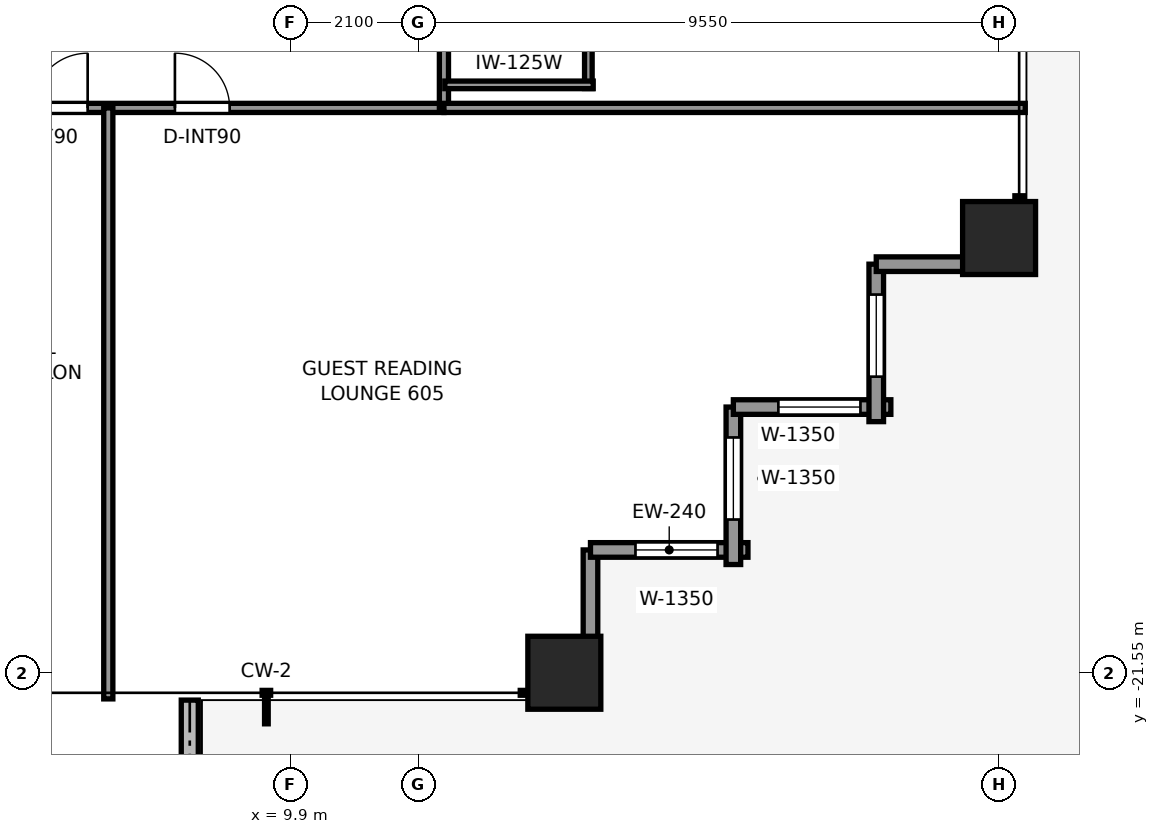
"""IFC4 building model, lengths in metres.
Left out: names, types, materials, properties, quantities, classifications, styles, units other than length and angle.
Written with IfcOpenShell. Run it as: python <this file> out.ifc"""

import sys

from ifc_helpers import new_model, si_unit, direction, frame, frame_2d, origin, origin_2d, place, context, subcontext, project, spatial, rectangle, extrude, element, fill, save


model = new_model("IFC4")
c1 = context("Model", 3, precision=1e-05, world=origin(), true_north=direction((0.0, 1.0)))
c2 = subcontext(c1, "Body", "Model", "MODEL_VIEW")
j1 = project(units=[si_unit("LENGTHUNIT", "METRE"), si_unit("PLANEANGLEUNIT", "RADIAN")], contexts=[c1])
p1 = place(None, origin())
s1 = spatial("IfcSite", under=j1, at=p1, CompositionType="ELEMENT")
p2 = place(p1, origin())
s2 = spatial("IfcBuilding", under=s1, at=p2, CompositionType="ELEMENT")
p3 = place(p2, frame((0.0, 0.0, 23.8)))
s3 = spatial("IfcBuildingStorey", under=s2, at=p3, CompositionType="ELEMENT", Elevation=23.8)
for number, where, z_axis, x_axis in (
    (1, (14.4, -21.55, 0.0), (0.0, 0.0, 1.0), (1.0, 0.0, 0.0)),
    (2, (21.55, -14.4, 0.0), (0.0, 0.0, 1.0), (1.0, 0.0, 0.0)),
):
    element("IfcColumn", number, at=place(p3, frame(where, z_axis=z_axis, x_axis=x_axis)), inside=s3, PredefinedType="COLUMN", context=c2, shape_type="SweptSolid", body=[
        extrude(rectangle(XDim=1.2, YDim=1.2, at=origin_2d()), origin(), (0.0, 0.0, 1.0), 3.3),
    ])
p4 = place(p3, frame((8.24, -25.42, -0.06), z_axis=(0.0, 0.0, 1.0), x_axis=(0.0, 1.0, 0.0)))
e3 = element("IfcWall", 3, at=p4, inside=s3, PredefinedType="PARAPET", context=c2, shape_type="SweptSolid", body=[
    extrude(rectangle(XDim=3.42, YDim=0.28, at=frame_2d((1.71, 0.0))), origin(), (0.0, 0.0, 1.0), 0.42),
])
p5 = place(p3, frame((14.83, -19.53, 0.0), z_axis=(0.0, 0.0, 1.0), x_axis=(0.0, -1.0, 0.0)))
e4 = element("IfcWall", 4, at=p5, inside=s3, PredefinedType="STANDARD", context=c2, shape_type="SweptSolid", body=[
    extrude(rectangle(XDim=2.59, YDim=0.24, at=frame_2d((1.295, 0.0))), origin(), (0.0, 0.0, 1.0), 2.439),
])
p6 = place(p3, frame((17.42, -19.53, 0.0), z_axis=(0.0, 0.0, 1.0), x_axis=(-1.0, 0.0, 0.0)))
e5 = element("IfcWall", 5, at=p6, inside=s3, PredefinedType="STANDARD", context=c2, shape_type="SweptSolid", body=[
    extrude(rectangle(XDim=2.59, YDim=0.24, at=frame_2d((1.295, 0.0))), origin(), (0.0, 0.0, 1.0), 2.439),
])
p7 = place(p6, frame((0.5, 0.0, 0.65)))
e6 = element("IfcOpeningElement", 6, at=p7, cuts=e5, PredefinedType="OPENING", context=c2, shape_type="SweptSolid", body=[
    extrude(rectangle(XDim=1.35, YDim=1.55, at=frame_2d((0.675, 0.775))), frame((0.0, 0.13, 0.0), z_axis=(0.0, -1.0, 0.0), x_axis=(1.0, 0.0, 0.0)), (0.0, 0.0, 1.0), 0.26),
])
p8 = place(p3, frame((17.18, -17.18, 0.0), z_axis=(0.0, 0.0, 1.0), x_axis=(0.0, -1.0, 0.0)))
e7 = element("IfcWall", 7, at=p8, inside=s3, PredefinedType="STANDARD", context=c2, shape_type="SweptSolid", body=[
    extrude(rectangle(XDim=2.59, YDim=0.24, at=frame_2d((1.295, 0.0))), origin(), (0.0, 0.0, 1.0), 2.439),
])
p9 = place(p8, frame((0.5, 0.0, 0.65)))
e8 = element("IfcOpeningElement", 8, at=p9, cuts=e7, PredefinedType="OPENING", context=c2, shape_type="SweptSolid", body=[
    extrude(rectangle(XDim=1.35, YDim=1.55, at=frame_2d((0.675, 0.775))), frame((0.0, 0.13, 0.0), z_axis=(0.0, -1.0, 0.0), x_axis=(1.0, 0.0, 0.0)), (0.0, 0.0, 1.0), 0.26),
])
p10 = place(p3, frame((19.77, -17.18, 0.0), z_axis=(0.0, 0.0, 1.0), x_axis=(-1.0, 0.0, 0.0)))
e9 = element("IfcWall", 9, at=p10, inside=s3, PredefinedType="STANDARD", context=c2, shape_type="SweptSolid", body=[
    extrude(rectangle(XDim=2.59, YDim=0.24, at=frame_2d((1.295, 0.0))), origin(), (0.0, 0.0, 1.0), 2.439),
])
p11 = place(p10, frame((0.5, 0.0, 0.65)))
e10 = element("IfcOpeningElement", 10, at=p11, cuts=e9, PredefinedType="OPENING", context=c2, shape_type="SweptSolid", body=[
    extrude(rectangle(XDim=1.35, YDim=1.55, at=frame_2d((0.675, 0.775))), frame((0.0, 0.13, 0.0), z_axis=(0.0, -1.0, 0.0), x_axis=(1.0, 0.0, 0.0)), (0.0, 0.0, 1.0), 0.26),
])
p12 = place(p3, frame((19.53, -14.83, 0.0), z_axis=(0.0, 0.0, 1.0), x_axis=(0.0, -1.0, 0.0)))
e11 = element("IfcWall", 11, at=p12, inside=s3, PredefinedType="STANDARD", context=c2, shape_type="SweptSolid", body=[
    extrude(rectangle(XDim=2.59, YDim=0.24, at=frame_2d((1.295, 0.0))), origin(), (0.0, 0.0, 1.0), 2.439),
])
p13 = place(p12, frame((0.5, 0.0, 0.65)))
e12 = element("IfcOpeningElement", 12, at=p13, cuts=e11, PredefinedType="OPENING", context=c2, shape_type="SweptSolid", body=[
    extrude(rectangle(XDim=1.35, YDim=1.55, at=frame_2d((0.675, 0.775))), frame((0.0, 0.13, 0.0), z_axis=(0.0, -1.0, 0.0), x_axis=(1.0, 0.0, 0.0)), (0.0, 0.0, 1.0), 0.26),
])
p14 = place(p3, frame((22.12, -14.83, 0.0), z_axis=(0.0, 0.0, 1.0), x_axis=(-1.0, 0.0, 0.0)))
e13 = element("IfcWall", 13, at=p14, inside=s3, PredefinedType="STANDARD", context=c2, shape_type="SweptSolid", body=[
    extrude(rectangle(XDim=2.59, YDim=0.24, at=frame_2d((1.295, 0.0))), origin(), (0.0, 0.0, 1.0), 2.439),
])
p15 = place(p3, frame((-12.26, -12.26, 0.0), z_axis=(0.0, 0.0, 1.0), x_axis=(1.0, 0.0, 0.0)))
e14 = element("IfcWall", 14, at=p15, inside=s3, PredefinedType="PARTITIONING", context=c2, shape_type="SweptSolid", body=[
    extrude(rectangle(XDim=24.68, YDim=0.15, at=frame_2d((12.34, 0.0))), origin(), (0.0, 0.0, 1.0), 2.272),
])
p16 = place(p15, frame((3.444, 0.0, 0.0)))
e15 = element("IfcOpeningElement", 15, at=p16, cuts=e14, PredefinedType="OPENING", context=c2, shape_type="SweptSolid", body=[
    extrude(rectangle(XDim=0.9, YDim=2.06, at=frame_2d((0.45, 1.03))), frame((0.0, 0.085, 0.0), z_axis=(0.0, -1.0, 0.0), x_axis=(1.0, 0.0, 0.0)), (0.0, 0.0, 1.0), 0.17),
])
p17 = place(p15, frame((5.779, 0.0, 0.0)))
e16 = element("IfcOpeningElement", 16, at=p17, cuts=e14, PredefinedType="OPENING", context=c2, shape_type="SweptSolid", body=[
    extrude(rectangle(XDim=0.9, YDim=2.06, at=frame_2d((0.45, 1.03))), frame((0.0, 0.085, 0.0), z_axis=(0.0, -1.0, 0.0), x_axis=(1.0, 0.0, 0.0)), (0.0, 0.0, 1.0), 0.17),
])
p18 = place(p15, frame((13.551, 0.0, 0.0)))
e17 = element("IfcOpeningElement", 17, at=p18, cuts=e14, PredefinedType="OPENING", context=c2, shape_type="SweptSolid", body=[
    extrude(rectangle(XDim=0.9, YDim=2.06, at=frame_2d((0.45, 1.03))), frame((0.0, 0.085, 0.0), z_axis=(0.0, -1.0, 0.0), x_axis=(1.0, 0.0, 0.0)), (0.0, 0.0, 1.0), 0.17),
])
p19 = place(p15, frame((17.921, 0.0, 0.0)))
e18 = element("IfcOpeningElement", 18, at=p19, cuts=e14, PredefinedType="OPENING", context=c2, shape_type="SweptSolid", body=[
    extrude(rectangle(XDim=0.9, YDim=2.06, at=frame_2d((0.45, 1.03))), frame((0.0, 0.085, 0.0), z_axis=(0.0, -1.0, 0.0), x_axis=(1.0, 0.0, 0.0)), (0.0, 0.0, 1.0), 0.17),
])
p20 = place(p15, frame((20.256, 0.0, 0.0)))
e19 = element("IfcOpeningElement", 19, at=p20, cuts=e14, PredefinedType="OPENING", context=c2, shape_type="SweptSolid", body=[
    extrude(rectangle(XDim=0.9, YDim=2.06, at=frame_2d((0.45, 1.03))), frame((0.0, 0.085, 0.0), z_axis=(0.0, -1.0, 0.0), x_axis=(1.0, 0.0, 0.0)), (0.0, 0.0, 1.0), 0.17),
])
p21 = place(p3, frame((12.42, -12.26, 0.0), z_axis=(0.0, 0.0, 1.0), x_axis=(0.0, 1.0, 0.0)))
e20 = element("IfcWall", 20, at=p21, inside=s3, PredefinedType="PARTITIONING", context=c2, shape_type="SweptSolid", body=[
    extrude(rectangle(XDim=24.84, YDim=0.15, at=frame_2d((12.42, 0.0))), origin(), (0.0, 0.0, 1.0), 2.272),
])
p22 = place(p21, frame((4.099, 0.0, 0.0)))
e21 = element("IfcOpeningElement", 21, at=p22, cuts=e20, PredefinedType="OPENING", context=c2, shape_type="SweptSolid", body=[
    extrude(rectangle(XDim=0.95, YDim=2.06, at=frame_2d((0.475, 1.03))), frame((0.0, 0.085, 0.0), z_axis=(0.0, -1.0, 0.0), x_axis=(1.0, 0.0, 0.0)), (0.0, 0.0, 1.0), 0.17),
])
p23 = place(p21, frame((13.577, 0.0, 0.0)))
e22 = element("IfcOpeningElement", 22, at=p23, cuts=e20, PredefinedType="OPENING", context=c2, shape_type="SweptSolid", body=[
    extrude(rectangle(XDim=0.95, YDim=2.06, at=frame_2d((0.475, 1.03))), frame((0.0, 0.085, 0.0), z_axis=(0.0, -1.0, 0.0), x_axis=(1.0, 0.0, 0.0)), (0.0, 0.0, 1.0), 0.17),
])
p24 = place(p21, frame((19.692, 0.0, 0.0)))
e23 = element("IfcOpeningElement", 23, at=p24, cuts=e20, PredefinedType="OPENING", context=c2, shape_type="SweptSolid", body=[
    extrude(rectangle(XDim=0.95, YDim=2.06, at=frame_2d((0.475, 1.03))), frame((0.0, 0.085, 0.0), z_axis=(0.0, -1.0, 0.0), x_axis=(1.0, 0.0, 0.0)), (0.0, 0.0, 1.0), 0.17),
])
p25 = place(p3, frame((12.42, -12.26, 0.0), z_axis=(0.0, 0.0, 1.0), x_axis=(1.0, 0.0, 0.0)))
e24 = element("IfcWall", 24, at=p25, inside=s3, PredefinedType="PARTITIONING", context=c2, shape_type="SweptSolid", body=[
    extrude(rectangle(XDim=9.56, YDim=0.15, at=frame_2d((4.78, 0.0))), origin(), (0.0, 0.0, 1.0), 2.272),
])
p26 = place(p3, frame((6.9, -21.98, 0.0), z_axis=(0.0, 0.0, 1.0), x_axis=(0.0, 1.0, 0.0)))
e25 = element("IfcWall", 25, at=p26, inside=s3, PredefinedType="PARTITIONING", context=c2, shape_type="SweptSolid", body=[
    extrude(rectangle(XDim=9.72, YDim=0.15, at=frame_2d((4.86, 0.0))), origin(), (0.0, 0.0, 1.0), 2.429),
])
p27 = place(p3, frame((14.795, -11.941, 0.0), z_axis=(0.0, 0.0, 1.0), x_axis=(0.0, 1.0, 0.0)))
e26 = element("IfcWall", 26, at=p27, inside=s3, PredefinedType="PARTITIONING", context=c2, shape_type="SweptSolid", body=[
    extrude(rectangle(XDim=2.27, YDim=0.125, at=frame_2d((1.135, 0.0))), origin(), (0.0, 0.0, 1.0), 2.272),
])
p28 = place(p3, frame((12.435, -11.881, 0.0), z_axis=(0.0, 0.0, 1.0), x_axis=(1.0, 0.0, 0.0)))
e27 = element("IfcWall", 27, at=p28, inside=s3, PredefinedType="PARTITIONING", context=c2, shape_type="SweptSolid", body=[
    extrude(rectangle(XDim=2.44, YDim=0.125, at=frame_2d((1.22, 0.0))), origin(), (0.0, 0.0, 1.0), 2.272),
])
p29 = place(p7, origin())
e28 = element("IfcWindow", 28, at=p29, inside=s3, PartitioningType="SINGLE_PANEL", PredefinedType="WINDOW", context=c2, shape_type="SweptSolid", body=[
    extrude(rectangle(XDim=1.35, YDim=1.55, at=frame_2d((0.675, 0.775))), frame((0.0, 0.03, 0.0), z_axis=(0.0, -1.0, 0.0), x_axis=(1.0, 0.0, 0.0)), (0.0, 0.0, 1.0), 0.06),
])
fill(e6, e28)
p30 = place(p9, origin())
e29 = element("IfcWindow", 29, at=p30, inside=s3, PartitioningType="SINGLE_PANEL", PredefinedType="WINDOW", context=c2, shape_type="SweptSolid", body=[
    extrude(rectangle(XDim=1.35, YDim=1.55, at=frame_2d((0.675, 0.775))), frame((0.0, 0.03, 0.0), z_axis=(0.0, -1.0, 0.0), x_axis=(1.0, 0.0, 0.0)), (0.0, 0.0, 1.0), 0.06),
])
fill(e8, e29)
p31 = place(p11, origin())
e30 = element("IfcWindow", 30, at=p31, inside=s3, PartitioningType="SINGLE_PANEL", PredefinedType="WINDOW", context=c2, shape_type="SweptSolid", body=[
    extrude(rectangle(XDim=1.35, YDim=1.55, at=frame_2d((0.675, 0.775))), frame((0.0, 0.03, 0.0), z_axis=(0.0, -1.0, 0.0), x_axis=(1.0, 0.0, 0.0)), (0.0, 0.0, 1.0), 0.06),
])
fill(e10, e30)
p32 = place(p13, origin())
e31 = element("IfcWindow", 31, at=p32, inside=s3, PartitioningType="SINGLE_PANEL", PredefinedType="WINDOW", context=c2, shape_type="SweptSolid", body=[
    extrude(rectangle(XDim=1.35, YDim=1.55, at=frame_2d((0.675, 0.775))), frame((0.0, 0.03, 0.0), z_axis=(0.0, -1.0, 0.0), x_axis=(1.0, 0.0, 0.0)), (0.0, 0.0, 1.0), 0.06),
])
fill(e12, e31)
p33 = place(p19, origin())
e32 = element("IfcDoor", 32, at=p33, inside=s3, OperationType="SINGLE_SWING_RIGHT", PredefinedType="DOOR", context=c2, shape_type="SweptSolid", body=[
    extrude(rectangle(XDim=0.9, YDim=2.06, at=frame_2d((0.45, 1.03))), frame((0.0, 0.025, 0.0), z_axis=(0.0, -1.0, 0.0), x_axis=(1.0, 0.0, 0.0)), (0.0, 0.0, 1.0), 0.05),
])
fill(e18, e32)
p34 = place(p20, origin())
e33 = element("IfcDoor", 33, at=p34, inside=s3, OperationType="SINGLE_SWING_LEFT", PredefinedType="DOOR", context=c2, shape_type="SweptSolid", body=[
    extrude(rectangle(XDim=0.9, YDim=2.06, at=frame_2d((0.45, 1.03))), frame((0.0, 0.025, 0.0), z_axis=(0.0, -1.0, 0.0), x_axis=(1.0, 0.0, 0.0)), (0.0, 0.0, 1.0), 0.05),
])
fill(e19, e33)
save(model, sys.argv[1])
